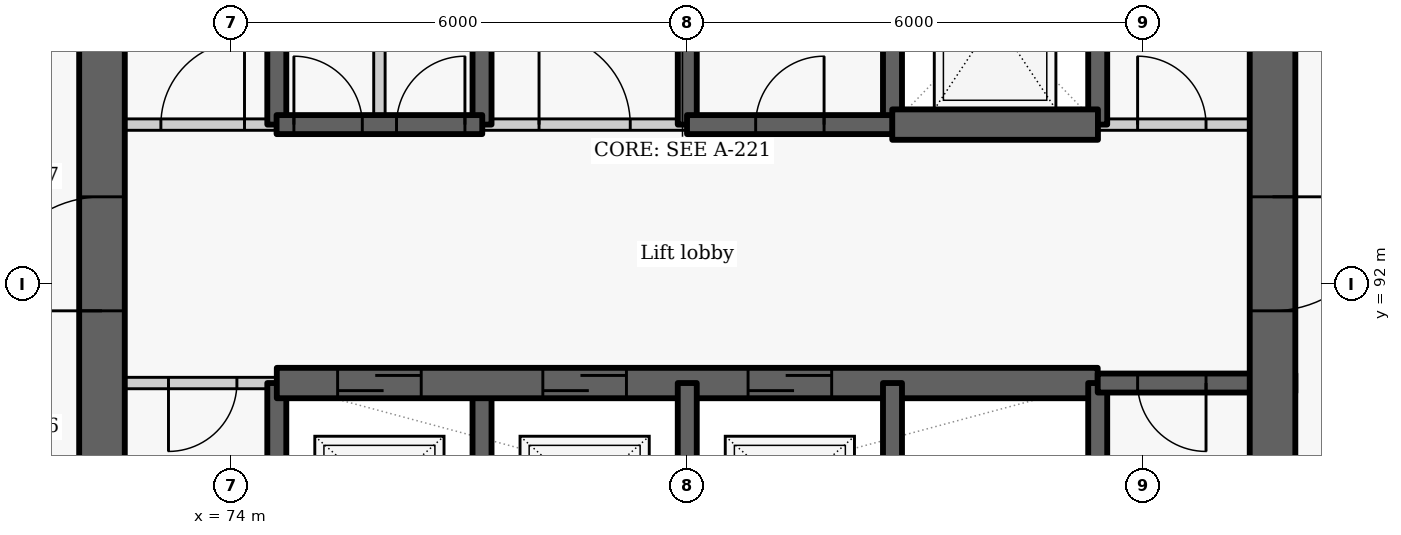
"""IFC4 building model, lengths in metres.
Left out: names, types, materials, properties, quantities, classifications, styles, units other than length and angle.
Written with IfcOpenShell. Run it as: python <this file> out.ifc"""

import sys

from ifc_helpers import new_model, si_unit, direction, frame, frame_2d, origin, place, context, subcontext, project, spatial, rectangle, extrude, element, fill, save


model = new_model("IFC4")
c1 = context("Model", 3, precision=1e-05, world=origin(), true_north=direction((0.0, 1.0)))
c2 = subcontext(c1, "Body", "Model", "MODEL_VIEW")
j1 = project(units=[si_unit("LENGTHUNIT", "METRE"), si_unit("PLANEANGLEUNIT", "RADIAN")], contexts=[c1])
p1 = place(None, origin())
s1 = spatial("IfcSite", under=j1, at=p1, CompositionType="ELEMENT")
p2 = place(p1, origin())
s2 = spatial("IfcBuilding", under=s1, at=p2, CompositionType="ELEMENT")
p3 = place(p2, frame((0.0, 0.0, 114.0)))
s3 = spatial("IfcBuildingStorey", under=s2, at=p3, CompositionType="ELEMENT", Elevation=114.0)
p4 = place(p3, frame((74.6, 87.8, -0.275), z_axis=(0.0, 0.0, 1.0), x_axis=(0.0, 1.0, 0.0)))
e1 = element("IfcWall", 1, at=p4, inside=s3, PredefinedType="SHEAR", context=c2, shape_type="SweptSolid", body=[
    extrude(rectangle(XDim=2.9, YDim=0.25, at=frame_2d((1.45, 0.0))), origin(), (0.0, 0.0, 1.0), 3.3),
])
p5 = place(p3, frame((74.6, 94.1, -0.275), z_axis=(0.0, 0.0, 1.0), x_axis=(0.0, 1.0, 0.0)))
e2 = element("IfcWall", 2, at=p5, inside=s3, PredefinedType="SHEAR", context=c2, shape_type="SweptSolid", body=[
    extrude(rectangle(XDim=2.8, YDim=0.25, at=frame_2d((1.4, 0.0))), origin(), (0.0, 0.0, 1.0), 3.3),
])
p6 = place(p3, frame((74.6, 90.7, 0.0), z_axis=(0.0, 0.0, 1.0), x_axis=(-1.0, 0.0, 0.0)))
e3 = element("IfcWall", 3, at=p6, inside=s3, PredefinedType="PARTITIONING", context=c2, shape_type="SweptSolid", body=[
    extrude(rectangle(XDim=2.6, YDim=0.15, at=frame_2d((1.3, 0.0))), origin(), (0.0, 0.0, 1.0), 3.025),
])
p7 = place(p6, frame((0.525, 0.0, 0.0)))
e4 = element("IfcOpeningElement", 4, at=p7, cuts=e3, PredefinedType="OPENING", context=c2, shape_type="SweptSolid", body=[
    extrude(rectangle(XDim=0.9, YDim=2.1, at=frame_2d((0.45, 1.05))), frame((0.0, 0.085, 0.0), z_axis=(0.0, -1.0, 0.0), x_axis=(1.0, 0.0, 0.0)), (0.0, 0.0, 1.0), 0.17),
])
p8 = place(p3, frame((72.3, 87.8, -0.275), z_axis=(0.0, 0.0, 1.0), x_axis=(0.0, 1.0, 0.0)))
e5 = element("IfcWall", 5, at=p8, inside=s3, PredefinedType="SHEAR", context=c2, shape_type="SweptSolid", body=[
    extrude(rectangle(XDim=9.1, YDim=0.6, at=frame_2d((4.55, 0.0))), origin(), (0.0, 0.0, 1.0), 3.3),
])
p9 = place(p8, frame((3.85, 0.0, 0.275)))
e6 = element("IfcOpeningElement", 6, at=p9, cuts=e5, PredefinedType="OPENING", context=c2, shape_type="SweptSolid", body=[
    extrude(rectangle(XDim=1.5, YDim=2.1, at=frame_2d((0.75, 1.05))), frame((0.0, 0.31, 0.0), z_axis=(0.0, -1.0, 0.0), x_axis=(1.0, 0.0, 0.0)), (0.0, 0.0, 1.0), 0.62),
])
p10 = place(p3, frame((77.3, 87.8, -0.275), z_axis=(0.0, 0.0, 1.0), x_axis=(0.0, 1.0, 0.0)))
e7 = element("IfcWall", 7, at=p10, inside=s3, PredefinedType="SHEAR", context=c2, shape_type="SweptSolid", body=[
    extrude(rectangle(XDim=2.9, YDim=0.25, at=frame_2d((1.45, 0.0))), origin(), (0.0, 0.0, 1.0), 3.3),
])
p11 = place(p3, frame((77.3, 94.1, -0.275), z_axis=(0.0, 0.0, 1.0), x_axis=(0.0, 1.0, 0.0)))
e8 = element("IfcWall", 8, at=p11, inside=s3, PredefinedType="SHEAR", context=c2, shape_type="SweptSolid", body=[
    extrude(rectangle(XDim=2.8, YDim=0.25, at=frame_2d((1.4, 0.0))), origin(), (0.0, 0.0, 1.0), 3.3),
])
p12 = place(p3, frame((74.6, 90.7, -0.275), z_axis=(0.0, 0.0, 1.0), x_axis=(1.0, 0.0, 0.0)))
e9 = element("IfcWall", 9, at=p12, inside=s3, PredefinedType="SHEAR", context=c2, shape_type="SweptSolid", body=[
    extrude(rectangle(XDim=10.8, YDim=0.4, at=frame_2d((5.4, 0.0))), origin(), (0.0, 0.0, 1.0), 3.3),
])
p13 = place(p12, frame((0.8, 0.0, 0.275)))
e10 = element("IfcOpeningElement", 10, at=p13, cuts=e9, PredefinedType="OPENING", context=c2, shape_type="SweptSolid", body=[
    extrude(rectangle(XDim=1.1, YDim=2.1, at=frame_2d((0.55, 1.05))), frame((0.0, 0.21, 0.0), z_axis=(0.0, -1.0, 0.0), x_axis=(1.0, 0.0, 0.0)), (0.0, 0.0, 1.0), 0.42),
])
p14 = place(p12, frame((3.5, 0.0, 0.275)))
e11 = element("IfcOpeningElement", 11, at=p14, cuts=e9, PredefinedType="OPENING", context=c2, shape_type="SweptSolid", body=[
    extrude(rectangle(XDim=1.1, YDim=2.1, at=frame_2d((0.55, 1.05))), frame((0.0, 0.21, 0.0), z_axis=(0.0, -1.0, 0.0), x_axis=(1.0, 0.0, 0.0)), (0.0, 0.0, 1.0), 0.42),
])
p15 = place(p12, frame((6.2, 0.0, 0.275)))
e12 = element("IfcOpeningElement", 12, at=p15, cuts=e9, PredefinedType="OPENING", context=c2, shape_type="SweptSolid", body=[
    extrude(rectangle(XDim=1.1, YDim=2.1, at=frame_2d((0.55, 1.05))), frame((0.0, 0.21, 0.0), z_axis=(0.0, -1.0, 0.0), x_axis=(1.0, 0.0, 0.0)), (0.0, 0.0, 1.0), 0.42),
])
p16 = place(p3, frame((80.0, 87.8, -0.275), z_axis=(0.0, 0.0, 1.0), x_axis=(0.0, 1.0, 0.0)))
e13 = element("IfcWall", 13, at=p16, inside=s3, PredefinedType="SHEAR", context=c2, shape_type="SweptSolid", body=[
    extrude(rectangle(XDim=2.9, YDim=0.25, at=frame_2d((1.45, 0.0))), origin(), (0.0, 0.0, 1.0), 3.3),
])
p17 = place(p3, frame((80.0, 94.1, -0.275), z_axis=(0.0, 0.0, 1.0), x_axis=(0.0, 1.0, 0.0)))
e14 = element("IfcWall", 14, at=p17, inside=s3, PredefinedType="SHEAR", context=c2, shape_type="SweptSolid", body=[
    extrude(rectangle(XDim=2.8, YDim=0.25, at=frame_2d((1.4, 0.0))), origin(), (0.0, 0.0, 1.0), 3.3),
])
p18 = place(p3, frame((82.7, 87.8, -0.275), z_axis=(0.0, 0.0, 1.0), x_axis=(0.0, 1.0, 0.0)))
e15 = element("IfcWall", 15, at=p18, inside=s3, PredefinedType="SHEAR", context=c2, shape_type="SweptSolid", body=[
    extrude(rectangle(XDim=2.9, YDim=0.25, at=frame_2d((1.45, 0.0))), origin(), (0.0, 0.0, 1.0), 3.3),
])
p19 = place(p3, frame((82.7, 94.1, -0.275), z_axis=(0.0, 0.0, 1.0), x_axis=(0.0, 1.0, 0.0)))
e16 = element("IfcWall", 16, at=p19, inside=s3, PredefinedType="SHEAR", context=c2, shape_type="SweptSolid", body=[
    extrude(rectangle(XDim=2.8, YDim=0.25, at=frame_2d((1.4, 0.0))), origin(), (0.0, 0.0, 1.0), 3.3),
])
p20 = place(p3, frame((85.4, 87.8, -0.275), z_axis=(0.0, 0.0, 1.0), x_axis=(0.0, 1.0, 0.0)))
e17 = element("IfcWall", 17, at=p20, inside=s3, PredefinedType="SHEAR", context=c2, shape_type="SweptSolid", body=[
    extrude(rectangle(XDim=2.9, YDim=0.25, at=frame_2d((1.45, 0.0))), origin(), (0.0, 0.0, 1.0), 3.3),
])
p21 = place(p3, frame((85.4, 94.1, -0.275), z_axis=(0.0, 0.0, 1.0), x_axis=(0.0, 1.0, 0.0)))
e18 = element("IfcWall", 18, at=p21, inside=s3, PredefinedType="SHEAR", context=c2, shape_type="SweptSolid", body=[
    extrude(rectangle(XDim=2.8, YDim=0.25, at=frame_2d((1.4, 0.0))), origin(), (0.0, 0.0, 1.0), 3.3),
])
p22 = place(p3, frame((88.0, 90.7, -0.275), z_axis=(0.0, 0.0, 1.0), x_axis=(-1.0, 0.0, 0.0)))
e19 = element("IfcWall", 19, at=p22, inside=s3, PredefinedType="SHEAR", context=c2, shape_type="SweptSolid", body=[
    extrude(rectangle(XDim=2.6, YDim=0.25, at=frame_2d((1.3, 0.0))), origin(), (0.0, 0.0, 1.0), 3.3),
])
p23 = place(p22, frame((1.175, 0.0, 0.275)))
e20 = element("IfcOpeningElement", 20, at=p23, cuts=e19, PredefinedType="OPENING", context=c2, shape_type="SweptSolid", body=[
    extrude(rectangle(XDim=0.9, YDim=2.1, at=frame_2d((0.45, 1.05))), frame((0.0, 0.135, 0.0), z_axis=(0.0, -1.0, 0.0), x_axis=(1.0, 0.0, 0.0)), (0.0, 0.0, 1.0), 0.27),
])
p24 = place(p3, frame((87.7, 103.4, -0.275), z_axis=(0.0, 0.0, 1.0), x_axis=(0.0, -1.0, 0.0)))
e21 = element("IfcWall", 21, at=p24, inside=s3, PredefinedType="SHEAR", context=c2, shape_type="SweptSolid", body=[
    extrude(rectangle(XDim=15.6, YDim=0.6, at=frame_2d((7.8, 0.0))), origin(), (0.0, 0.0, 1.0), 3.3),
])
p25 = place(p24, frame((10.25, 0.0, 0.275)))
e22 = element("IfcOpeningElement", 22, at=p25, cuts=e21, PredefinedType="OPENING", context=c2, shape_type="SweptSolid", body=[
    extrude(rectangle(XDim=1.5, YDim=2.1, at=frame_2d((0.75, 1.05))), frame((0.0, 0.31, 0.0), z_axis=(0.0, -1.0, 0.0), x_axis=(1.0, 0.0, 0.0)), (0.0, 0.0, 1.0), 0.62),
])
p26 = place(p24, frame((2.7, 0.0, 0.275)))
e23 = element("IfcOpeningElement", 23, at=p26, cuts=e21, PredefinedType="OPENING", context=c2, shape_type="SweptSolid", body=[
    extrude(rectangle(XDim=1.1, YDim=2.1, at=frame_2d((0.55, 1.05))), frame((0.0, 0.31, 0.0), z_axis=(0.0, -1.0, 0.0), x_axis=(1.0, 0.0, 0.0)), (0.0, 0.0, 1.0), 0.62),
])
p27 = place(p3, frame((72.0, 94.1, 0.0), z_axis=(0.0, 0.0, 1.0), x_axis=(1.0, 0.0, 0.0)))
e24 = element("IfcWall", 24, at=p27, inside=s3, PredefinedType="PARTITIONING", context=c2, shape_type="SweptSolid", body=[
    extrude(rectangle(XDim=2.603, YDim=0.15, at=frame_2d((1.302, 0.0))), origin(), (0.0, 0.0, 1.0), 3.025),
])
p28 = place(p27, frame((1.075, 0.0, 0.0)))
e25 = element("IfcOpeningElement", 25, at=p28, cuts=e24, PredefinedType="OPENING", context=c2, shape_type="SweptSolid", body=[
    extrude(rectangle(XDim=1.1, YDim=2.1, at=frame_2d((0.55, 1.05))), frame((0.0, 0.085, 0.0), z_axis=(0.0, -1.0, 0.0), x_axis=(1.0, 0.0, 0.0)), (0.0, 0.0, 1.0), 0.17),
])
p29 = place(p3, frame((77.297, 94.1, 0.0), z_axis=(0.0, 0.0, 1.0), x_axis=(1.0, 0.0, 0.0)))
e26 = element("IfcWall", 26, at=p29, inside=s3, PredefinedType="PARTITIONING", context=c2, shape_type="SweptSolid", body=[
    extrude(rectangle(XDim=2.706, YDim=0.15, at=frame_2d((1.353, 0.0))), origin(), (0.0, 0.0, 1.0), 3.025),
])
p30 = place(p29, frame((0.753, 0.0, 0.0)))
e27 = element("IfcOpeningElement", 27, at=p30, cuts=e26, PredefinedType="OPENING", context=c2, shape_type="SweptSolid", body=[
    extrude(rectangle(XDim=1.2, YDim=2.1, at=frame_2d((0.6, 1.05))), frame((0.0, 0.085, 0.0), z_axis=(0.0, -1.0, 0.0), x_axis=(1.0, 0.0, 0.0)), (0.0, 0.0, 1.0), 0.17),
])
p31 = place(p3, frame((85.397, 94.1, 0.0), z_axis=(0.0, 0.0, 1.0), x_axis=(1.0, 0.0, 0.0)))
e28 = element("IfcWall", 28, at=p31, inside=s3, PredefinedType="PARTITIONING", context=c2, shape_type="SweptSolid", body=[
    extrude(rectangle(XDim=2.603, YDim=0.15, at=frame_2d((1.302, 0.0))), origin(), (0.0, 0.0, 1.0), 3.025),
])
p32 = place(p31, frame((0.528, 0.0, 0.0)))
e29 = element("IfcOpeningElement", 29, at=p32, cuts=e28, PredefinedType="OPENING", context=c2, shape_type="SweptSolid", body=[
    extrude(rectangle(XDim=0.9, YDim=2.1, at=frame_2d((0.45, 1.05))), frame((0.0, 0.085, 0.0), z_axis=(0.0, -1.0, 0.0), x_axis=(1.0, 0.0, 0.0)), (0.0, 0.0, 1.0), 0.17),
])
p33 = place(p3, frame((74.597, 94.1, -0.275), z_axis=(0.0, 0.0, 1.0), x_axis=(1.0, 0.0, 0.0)))
e30 = element("IfcWall", 30, at=p33, inside=s3, PredefinedType="SHEAR", context=c2, shape_type="SweptSolid", body=[
    extrude(rectangle(XDim=2.706, YDim=0.25, at=frame_2d((1.353, 0.0))), origin(), (0.0, 0.0, 1.0), 3.3),
])
p34 = place(p33, frame((0.228, 0.0, 0.275)))
e31 = element("IfcOpeningElement", 31, at=p34, cuts=e30, PredefinedType="OPENING", context=c2, shape_type="SweptSolid", body=[
    extrude(rectangle(XDim=0.9, YDim=2.1, at=frame_2d((0.45, 1.05))), frame((0.0, 0.135, 0.0), z_axis=(0.0, -1.0, 0.0), x_axis=(1.0, 0.0, 0.0)), (0.0, 0.0, 1.0), 0.27),
])
p35 = place(p33, frame((1.578, 0.0, 0.275)))
e32 = element("IfcOpeningElement", 32, at=p35, cuts=e30, PredefinedType="OPENING", context=c2, shape_type="SweptSolid", body=[
    extrude(rectangle(XDim=0.9, YDim=2.1, at=frame_2d((0.45, 1.05))), frame((0.0, 0.135, 0.0), z_axis=(0.0, -1.0, 0.0), x_axis=(1.0, 0.0, 0.0)), (0.0, 0.0, 1.0), 0.27),
])
p36 = place(p3, frame((79.997, 94.1, -0.275), z_axis=(0.0, 0.0, 1.0), x_axis=(1.0, 0.0, 0.0)))
e33 = element("IfcWall", 33, at=p36, inside=s3, PredefinedType="SHEAR", context=c2, shape_type="SweptSolid", body=[
    extrude(rectangle(XDim=2.706, YDim=0.25, at=frame_2d((1.353, 0.0))), origin(), (0.0, 0.0, 1.0), 3.3),
])
p37 = place(p36, frame((0.903, 0.0, 0.275)))
e34 = element("IfcOpeningElement", 34, at=p37, cuts=e33, PredefinedType="OPENING", context=c2, shape_type="SweptSolid", body=[
    extrude(rectangle(XDim=0.9, YDim=2.1, at=frame_2d((0.45, 1.05))), frame((0.0, 0.135, 0.0), z_axis=(0.0, -1.0, 0.0), x_axis=(1.0, 0.0, 0.0)), (0.0, 0.0, 1.0), 0.27),
])
p38 = place(p3, frame((82.697, 94.1, -0.275), z_axis=(0.0, 0.0, 1.0), x_axis=(1.0, 0.0, 0.0)))
e35 = element("IfcWall", 35, at=p38, inside=s3, PredefinedType="SHEAR", context=c2, shape_type="SweptSolid", body=[
    extrude(rectangle(XDim=2.706, YDim=0.4, at=frame_2d((1.353, 0.0))), origin(), (0.0, 0.0, 1.0), 3.3),
])
p39 = place(p3, frame((75.95, 94.1, 0.0), z_axis=(0.0, 0.0, 1.0), x_axis=(0.0, 1.0, 0.0)))
e36 = element("IfcWall", 36, at=p39, inside=s3, PredefinedType="PARTITIONING", context=c2, shape_type="SweptSolid", body=[
    extrude(rectangle(XDim=2.8, YDim=0.15, at=frame_2d((1.4, 0.0))), origin(), (0.0, 0.0, 1.0), 3.025),
])
p40 = place(p7, origin())
e37 = element("IfcDoor", 37, at=p40, inside=s3, OperationType="SINGLE_SWING_RIGHT", PredefinedType="DOOR", context=c2, shape_type="SweptSolid", body=[
    extrude(rectangle(XDim=0.9, YDim=2.1, at=frame_2d((0.45, 1.05))), frame((0.0, 0.025, 0.0), z_axis=(0.0, -1.0, 0.0), x_axis=(1.0, 0.0, 0.0)), (0.0, 0.0, 1.0), 0.05),
])
fill(e4, e37)
p41 = place(p13, origin())
e38 = element("IfcDoor", 38, at=p41, inside=s3, OperationType="SLIDING_TO_LEFT", PredefinedType="DOOR", context=c2, shape_type="SweptSolid", body=[
    extrude(rectangle(XDim=1.1, YDim=2.1, at=frame_2d((0.55, 1.05))), frame((0.0, 0.025, 0.0), z_axis=(0.0, -1.0, 0.0), x_axis=(1.0, 0.0, 0.0)), (0.0, 0.0, 1.0), 0.05),
])
fill(e10, e38)
p42 = place(p14, origin())
e39 = element("IfcDoor", 39, at=p42, inside=s3, OperationType="SLIDING_TO_LEFT", PredefinedType="DOOR", context=c2, shape_type="SweptSolid", body=[
    extrude(rectangle(XDim=1.1, YDim=2.1, at=frame_2d((0.55, 1.05))), frame((0.0, 0.025, 0.0), z_axis=(0.0, -1.0, 0.0), x_axis=(1.0, 0.0, 0.0)), (0.0, 0.0, 1.0), 0.05),
])
fill(e11, e39)
p43 = place(p15, origin())
e40 = element("IfcDoor", 40, at=p43, inside=s3, OperationType="SLIDING_TO_LEFT", PredefinedType="DOOR", context=c2, shape_type="SweptSolid", body=[
    extrude(rectangle(XDim=1.1, YDim=2.1, at=frame_2d((0.55, 1.05))), frame((0.0, 0.025, 0.0), z_axis=(0.0, -1.0, 0.0), x_axis=(1.0, 0.0, 0.0)), (0.0, 0.0, 1.0), 0.05),
])
fill(e12, e40)
p44 = place(p23, origin())
e41 = element("IfcDoor", 41, at=p44, inside=s3, OperationType="SINGLE_SWING_LEFT", PredefinedType="DOOR", context=c2, shape_type="SweptSolid", body=[
    extrude(rectangle(XDim=0.9, YDim=2.1, at=frame_2d((0.45, 1.05))), frame((0.0, 0.025, 0.0), z_axis=(0.0, -1.0, 0.0), x_axis=(1.0, 0.0, 0.0)), (0.0, 0.0, 1.0), 0.05),
])
fill(e20, e41)
p45 = place(p28, origin())
e42 = element("IfcDoor", 42, at=p45, inside=s3, OperationType="SINGLE_SWING_RIGHT", PredefinedType="DOOR", context=c2, shape_type="SweptSolid", body=[
    extrude(rectangle(XDim=1.1, YDim=2.1, at=frame_2d((0.55, 1.05))), frame((0.0, 0.025, 0.0), z_axis=(0.0, -1.0, 0.0), x_axis=(1.0, 0.0, 0.0)), (0.0, 0.0, 1.0), 0.05),
])
fill(e25, e42)
p46 = place(p34, origin())
e43 = element("IfcDoor", 43, at=p46, inside=s3, OperationType="SINGLE_SWING_LEFT", PredefinedType="DOOR", context=c2, shape_type="SweptSolid", body=[
    extrude(rectangle(XDim=0.9, YDim=2.1, at=frame_2d((0.45, 1.05))), frame((0.0, 0.025, 0.0), z_axis=(0.0, -1.0, 0.0), x_axis=(1.0, 0.0, 0.0)), (0.0, 0.0, 1.0), 0.05),
])
fill(e31, e43)
p47 = place(p35, origin())
e44 = element("IfcDoor", 44, at=p47, inside=s3, OperationType="SINGLE_SWING_RIGHT", PredefinedType="DOOR", context=c2, shape_type="SweptSolid", body=[
    extrude(rectangle(XDim=0.9, YDim=2.1, at=frame_2d((0.45, 1.05))), frame((0.0, 0.025, 0.0), z_axis=(0.0, -1.0, 0.0), x_axis=(1.0, 0.0, 0.0)), (0.0, 0.0, 1.0), 0.05),
])
fill(e32, e44)
p48 = place(p30, origin())
e45 = element("IfcDoor", 45, at=p48, inside=s3, OperationType="DOUBLE_DOOR_SINGLE_SWING", PredefinedType="DOOR", context=c2, shape_type="SweptSolid", body=[
    extrude(rectangle(XDim=1.2, YDim=2.1, at=frame_2d((0.6, 1.05))), frame((0.0, 0.025, 0.0), z_axis=(0.0, -1.0, 0.0), x_axis=(1.0, 0.0, 0.0)), (0.0, 0.0, 1.0), 0.05),
])
fill(e27, e45)
p49 = place(p37, origin())
e46 = element("IfcDoor", 46, at=p49, inside=s3, OperationType="SINGLE_SWING_RIGHT", PredefinedType="DOOR", context=c2, shape_type="SweptSolid", body=[
    extrude(rectangle(XDim=0.9, YDim=2.1, at=frame_2d((0.45, 1.05))), frame((0.0, 0.025, 0.0), z_axis=(0.0, -1.0, 0.0), x_axis=(1.0, 0.0, 0.0)), (0.0, 0.0, 1.0), 0.05),
])
fill(e34, e46)
p50 = place(p32, origin())
e47 = element("IfcDoor", 47, at=p50, inside=s3, OperationType="SINGLE_SWING_LEFT", PredefinedType="DOOR", context=c2, shape_type="SweptSolid", body=[
    extrude(rectangle(XDim=0.9, YDim=2.1, at=frame_2d((0.45, 1.05))), frame((0.0, 0.025, 0.0), z_axis=(0.0, -1.0, 0.0), x_axis=(1.0, 0.0, 0.0)), (0.0, 0.0, 1.0), 0.05),
])
fill(e29, e47)
p51 = place(p25, origin())
e48 = element("IfcDoor", 48, at=p51, inside=s3, OperationType="DOUBLE_DOOR_SINGLE_SWING", PredefinedType="DOOR", context=c2, shape_type="SweptSolid", body=[
    extrude(rectangle(XDim=1.5, YDim=2.1, at=frame_2d((0.75, 1.05))), frame((0.0, 0.025, 0.0), z_axis=(0.0, -1.0, 0.0), x_axis=(1.0, 0.0, 0.0)), (0.0, 0.0, 1.0), 0.05),
])
fill(e22, e48)
p52 = place(p9, origin())
e49 = element("IfcDoor", 49, at=p52, inside=s3, OperationType="DOUBLE_DOOR_SINGLE_SWING", PredefinedType="DOOR", context=c2, shape_type="SweptSolid", body=[
    extrude(rectangle(XDim=1.5, YDim=2.1, at=frame_2d((0.75, 1.05))), frame((0.0, 0.025, 0.0), z_axis=(0.0, -1.0, 0.0), x_axis=(1.0, 0.0, 0.0)), (0.0, 0.0, 1.0), 0.05),
])
fill(e6, e49)
save(model, sys.argv[1])
